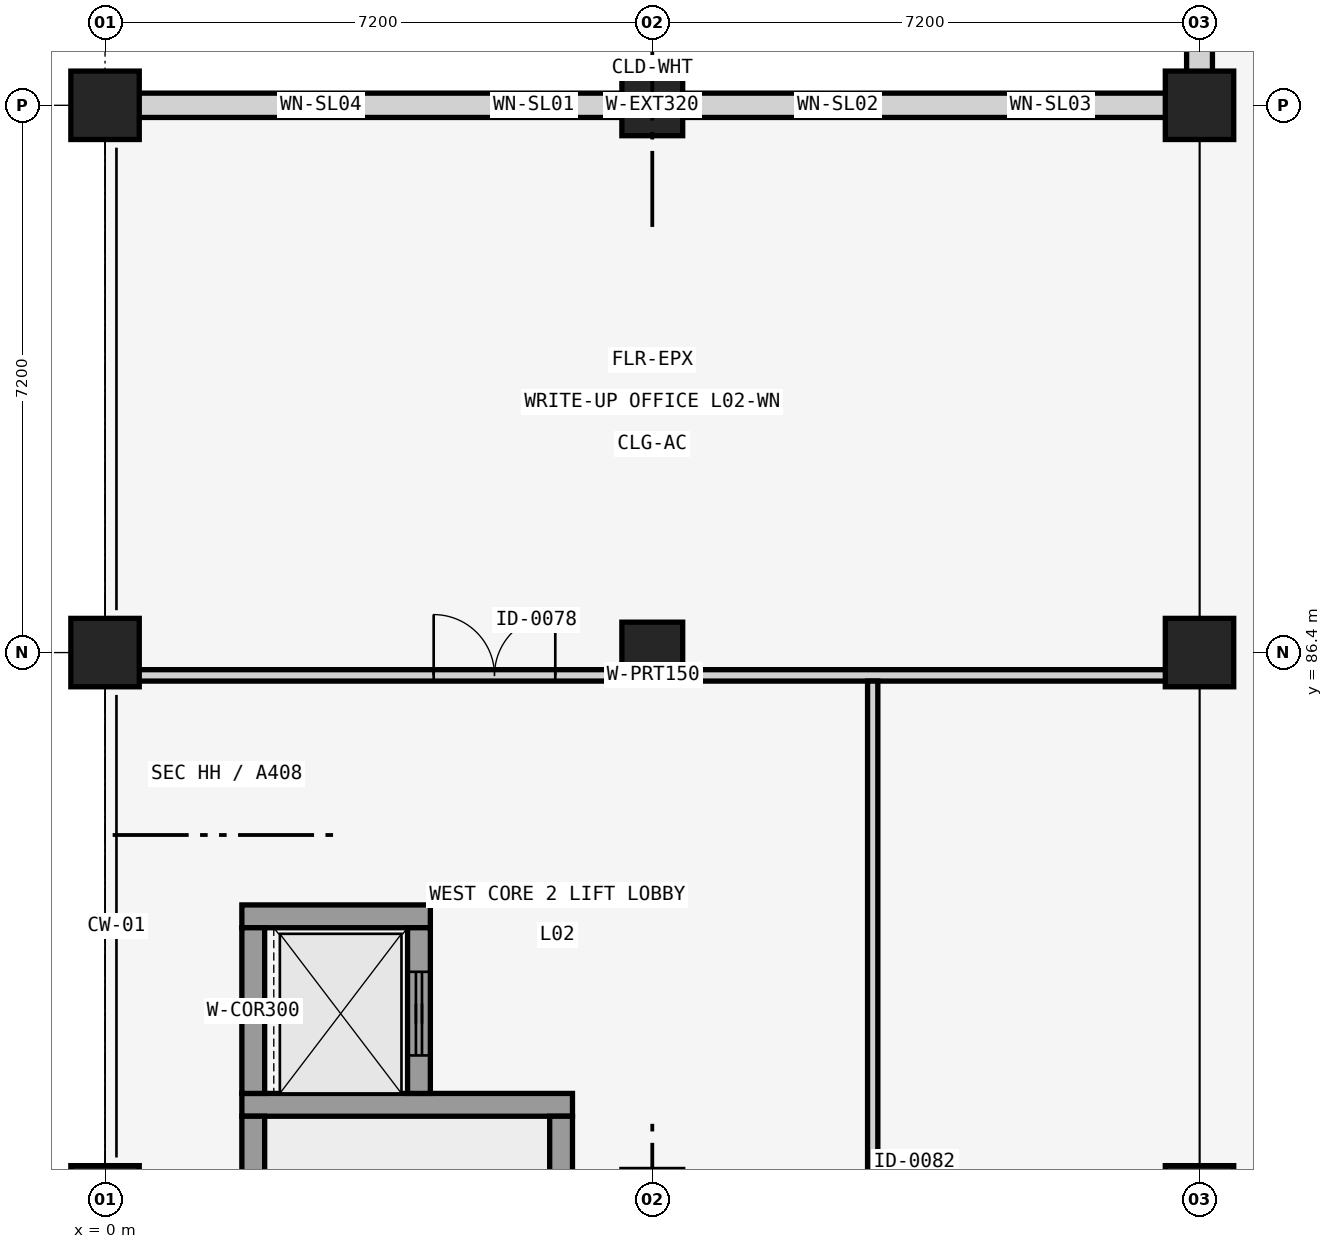
"""IFC4 building model, lengths in metres.
Left out: names, types, materials, properties, quantities, classifications, styles, units other than length and angle.
Written with IfcOpenShell. Run it as: python <this file> out.ifc"""

import sys

from ifc_helpers import new_model, si_unit, direction, frame, frame_2d, origin, origin_2d, place, context, subcontext, project, spatial, rectangle, extrude, element, fill, save


model = new_model("IFC4")
c1 = context("Model", 3, precision=1e-05, world=origin(), true_north=direction((0.0, 1.0)))
c2 = subcontext(c1, "Body", "Model", "MODEL_VIEW")
j1 = project(units=[si_unit("LENGTHUNIT", "METRE"), si_unit("PLANEANGLEUNIT", "RADIAN")], contexts=[c1])
p1 = place(None, origin())
s1 = spatial("IfcSite", under=j1, at=p1, CompositionType="ELEMENT")
p2 = place(p1, origin())
s2 = spatial("IfcBuilding", under=s1, at=p2, CompositionType="ELEMENT")
p3 = place(p2, frame((0.0, 0.0, 8.96)))
s3 = spatial("IfcBuildingStorey", under=s2, at=p3, CompositionType="ELEMENT", Elevation=8.96)
for number, where, z_axis, x_axis in (
    (1, (0.0, 79.2, 0.0), (0.0, 0.0, 1.0), (1.0, 0.0, 0.0)),
    (2, (0.0, 86.4, 0.0), (0.0, 0.0, 1.0), (1.0, 0.0, 0.0)),
    (3, (0.0, 93.6, 0.0), (0.0, 0.0, 1.0), (1.0, 0.0, 0.0)),
):
    element("IfcColumn", number, at=place(p3, frame(where, z_axis=z_axis, x_axis=x_axis)), inside=s3, PredefinedType="COLUMN", context=c2, shape_type="SweptSolid", body=[
        extrude(rectangle(XDim=0.9, YDim=0.9, at=origin_2d()), origin(), (0.0, 0.0, 1.0), 4.16),
    ])
for number, where, z_axis, x_axis in (
    (4, (7.2, 86.4, 0.0), (0.0, 0.0, 1.0), (1.0, 0.0, 0.0)),
    (5, (7.2, 93.6, 0.0), (0.0, 0.0, 1.0), (1.0, 0.0, 0.0)),
):
    element("IfcColumn", number, at=place(p3, frame(where, z_axis=z_axis, x_axis=x_axis)), inside=s3, PredefinedType="COLUMN", context=c2, shape_type="SweptSolid", body=[
        extrude(rectangle(XDim=0.8, YDim=0.8, at=origin_2d()), origin(), (0.0, 0.0, 1.0), 4.16),
    ])
for number, where, z_axis, x_axis in (
    (6, (14.4, 79.2, 0.0), (0.0, 0.0, 1.0), (1.0, 0.0, 0.0)),
    (7, (14.4, 86.4, 0.0), (0.0, 0.0, 1.0), (1.0, 0.0, 0.0)),
    (8, (14.4, 93.6, 0.0), (0.0, 0.0, 1.0), (1.0, 0.0, 0.0)),
):
    element("IfcColumn", number, at=place(p3, frame(where, z_axis=z_axis, x_axis=x_axis)), inside=s3, PredefinedType="COLUMN", context=c2, shape_type="SweptSolid", body=[
        extrude(rectangle(XDim=0.9, YDim=0.9, at=origin_2d()), origin(), (0.0, 0.0, 1.0), 4.16),
    ])
p4 = place(p3, frame((0.44, 93.6, 0.0), z_axis=(0.0, 0.0, 1.0), x_axis=(1.0, 0.0, 0.0)))
e9 = element("IfcWall", 9, at=p4, inside=s3, PredefinedType="SOLIDWALL", context=c2, shape_type="SweptSolid", body=[
    extrude(rectangle(XDim=13.52, YDim=0.32, at=frame_2d((6.76, 0.0))), origin(), (0.0, 0.0, 1.0), 3.42),
])
p5 = place(p4, frame((2.175, 0.0, 0.85)))
e10 = element("IfcOpeningElement", 10, at=p5, cuts=e9, PredefinedType="OPENING", context=c2, shape_type="SweptSolid", body=[
    extrude(rectangle(XDim=0.45, YDim=2.1, at=frame_2d((0.225, 1.05))), frame((0.0, 0.17, 0.0), z_axis=(0.0, -1.0, 0.0), x_axis=(1.0, 0.0, 0.0)), (0.0, 0.0, 1.0), 0.34),
])
p6 = place(p4, frame((4.975, 0.0, 0.85)))
e11 = element("IfcOpeningElement", 11, at=p6, cuts=e9, PredefinedType="OPENING", context=c2, shape_type="SweptSolid", body=[
    extrude(rectangle(XDim=0.45, YDim=2.4, at=frame_2d((0.225, 1.2))), frame((0.0, 0.17, 0.0), z_axis=(0.0, -1.0, 0.0), x_axis=(1.0, 0.0, 0.0)), (0.0, 0.0, 1.0), 0.34),
])
p7 = place(p4, frame((8.95, 0.0, 0.85)))
e12 = element("IfcOpeningElement", 12, at=p7, cuts=e9, PredefinedType="OPENING", context=c2, shape_type="SweptSolid", body=[
    extrude(rectangle(XDim=0.5, YDim=2.4, at=frame_2d((0.25, 1.2))), frame((0.0, 0.17, 0.0), z_axis=(0.0, -1.0, 0.0), x_axis=(1.0, 0.0, 0.0)), (0.0, 0.0, 1.0), 0.34),
])
p8 = place(p4, frame((11.725, 0.0, 0.85)))
e13 = element("IfcOpeningElement", 13, at=p8, cuts=e9, PredefinedType="OPENING", context=c2, shape_type="SweptSolid", body=[
    extrude(rectangle(XDim=0.55, YDim=2.2, at=frame_2d((0.275, 1.1))), frame((0.0, 0.17, 0.0), z_axis=(0.0, -1.0, 0.0), x_axis=(1.0, 0.0, 0.0)), (0.0, 0.0, 1.0), 0.34),
])
p9 = place(p3, frame((14.4, 94.04, 0.0), z_axis=(0.0, 0.0, 1.0), x_axis=(0.0, 1.0, 0.0)))
e14 = element("IfcWall", 14, at=p9, inside=s3, PredefinedType="SOLIDWALL", context=c2, shape_type="SweptSolid", body=[
    extrude(rectangle(XDim=6.42, YDim=0.34, at=frame_2d((3.21, 0.0))), origin(), (0.0, 0.0, 1.0), 3.21),
])
p10 = place(p9, frame((1.198, 0.0, 1.0)))
e15 = element("IfcOpeningElement", 15, at=p10, cuts=e14, PredefinedType="OPENING", context=c2, shape_type="SweptSolid", body=[
    extrude(rectangle(XDim=1.2, YDim=1.65, at=frame_2d((0.6, 0.825))), frame((0.0, 0.18, 0.0), z_axis=(0.0, -1.0, 0.0), x_axis=(1.0, 0.0, 0.0)), (0.0, 0.0, 1.0), 0.36),
])
p11 = place(p9, frame((3.722, 0.0, 1.0)))
e16 = element("IfcOpeningElement", 16, at=p11, cuts=e14, PredefinedType="OPENING", context=c2, shape_type="SweptSolid", body=[
    extrude(rectangle(XDim=1.8, YDim=1.65, at=frame_2d((0.9, 0.825))), frame((0.0, 0.18, 0.0), z_axis=(0.0, -1.0, 0.0), x_axis=(1.0, 0.0, 0.0)), (0.0, 0.0, 1.0), 0.36),
])
p12 = place(p3, frame((1.8, 80.45, 0.0), z_axis=(0.0, 0.0, 1.0), x_axis=(1.0, 0.0, 0.0)))
e17 = element("IfcWall", 17, at=p12, inside=s3, PredefinedType="SHEAR", context=c2, shape_type="SweptSolid", body=[
    extrude(rectangle(XDim=4.35, YDim=0.3, at=frame_2d((2.175, 0.0))), origin(), (0.0, 0.0, 1.0), 3.81),
])
p13 = place(p3, frame((1.95, 72.5, 0.0), z_axis=(0.0, 0.0, 1.0), x_axis=(0.0, 1.0, 0.0)))
e18 = element("IfcWall", 18, at=p13, inside=s3, PredefinedType="SHEAR", context=c2, shape_type="SweptSolid", body=[
    extrude(rectangle(XDim=7.8, YDim=0.3, at=frame_2d((3.9, 0.0))), origin(), (0.0, 0.0, 1.0), 3.81),
])
p14 = place(p3, frame((6.0, 72.5, 0.0), z_axis=(0.0, 0.0, 1.0), x_axis=(0.0, 1.0, 0.0)))
e19 = element("IfcWall", 19, at=p14, inside=s3, PredefinedType="SHEAR", context=c2, shape_type="SweptSolid", body=[
    extrude(rectangle(XDim=7.8, YDim=0.3, at=frame_2d((3.9, 0.0))), origin(), (0.0, 0.0, 1.0), 3.81),
])
p15 = place(p14, frame((0.4, 0.0, 0.0)))
e20 = element("IfcOpeningElement", 20, at=p15, cuts=e19, PredefinedType="OPENING", context=c2, shape_type="SweptSolid", body=[
    extrude(rectangle(XDim=1.15, YDim=2.2, at=frame_2d((0.575, 1.1))), frame((0.0, 0.16, 0.0), z_axis=(0.0, -1.0, 0.0), x_axis=(1.0, 0.0, 0.0)), (0.0, 0.0, 1.0), 0.32),
])
p16 = place(p3, frame((1.8, 82.93, 0.0), z_axis=(0.0, 0.0, 1.0), x_axis=(1.0, 0.0, 0.0)))
e21 = element("IfcWall", 21, at=p16, inside=s3, PredefinedType="SHEAR", context=c2, shape_type="SweptSolid", body=[
    extrude(rectangle(XDim=2.48, YDim=0.3, at=frame_2d((1.24, 0.0))), origin(), (0.0, 0.0, 1.0), 3.81),
])
p17 = place(p3, frame((1.95, 80.6, 0.0), z_axis=(0.0, 0.0, 1.0), x_axis=(0.0, 1.0, 0.0)))
e22 = element("IfcWall", 22, at=p17, inside=s3, PredefinedType="SHEAR", context=c2, shape_type="SweptSolid", body=[
    extrude(rectangle(XDim=2.18, YDim=0.3, at=frame_2d((1.09, 0.0))), origin(), (0.0, 0.0, 1.0), 3.81),
])
p18 = place(p3, frame((4.13, 80.6, 0.0), z_axis=(0.0, 0.0, 1.0), x_axis=(0.0, 1.0, 0.0)))
e23 = element("IfcWall", 23, at=p18, inside=s3, PredefinedType="SHEAR", context=c2, shape_type="SweptSolid", body=[
    extrude(rectangle(XDim=2.18, YDim=0.3, at=frame_2d((1.09, 0.0))), origin(), (0.0, 0.0, 1.0), 3.81),
])
p19 = place(p18, frame((0.5, 0.0, 0.0)))
e24 = element("IfcOpeningElement", 24, at=p19, cuts=e23, PredefinedType="OPENING", context=c2, shape_type="SweptSolid", body=[
    extrude(rectangle(XDim=1.1, YDim=2.2, at=frame_2d((0.55, 1.1))), frame((0.0, 0.16, 0.0), z_axis=(0.0, -1.0, 0.0), x_axis=(1.0, 0.0, 0.0)), (0.0, 0.0, 1.0), 0.32),
])
p20 = place(p3, frame((0.25, 86.1, 0.0), z_axis=(0.0, 0.0, 1.0), x_axis=(1.0, 0.0, 0.0)))
e25 = element("IfcWall", 25, at=p20, inside=s3, PredefinedType="PARTITIONING", context=c2, shape_type="SweptSolid", body=[
    extrude(rectangle(XDim=13.925, YDim=0.15, at=frame_2d((6.962, 0.0))), origin(), (0.0, 0.0, 1.0), 3.21),
])
p21 = place(p20, frame((4.074, 0.0, 0.0)))
e26 = element("IfcOpeningElement", 26, at=p21, cuts=e25, PredefinedType="OPENING", context=c2, shape_type="SweptSolid", body=[
    extrude(rectangle(XDim=1.6, YDim=2.25, at=frame_2d((0.8, 1.125))), frame((0.0, 0.085, 0.0), z_axis=(0.0, -1.0, 0.0), x_axis=(1.0, 0.0, 0.0)), (0.0, 0.0, 1.0), 0.17),
])
p22 = place(p3, frame((10.1, 71.9, 0.0), z_axis=(0.0, 0.0, 1.0), x_axis=(0.0, 1.0, 0.0)))
e27 = element("IfcWall", 27, at=p22, inside=s3, PredefinedType="PARTITIONING", context=c2, shape_type="SweptSolid", body=[
    extrude(rectangle(XDim=14.125, YDim=0.135, at=frame_2d((7.062, 0.0))), origin(), (0.0, 0.0, 1.0), 3.21),
])
p23 = place(p22, frame((6.562, 0.0, 0.0)))
e28 = element("IfcOpeningElement", 28, at=p23, cuts=e27, PredefinedType="OPENING", context=c2, shape_type="SweptSolid", body=[
    extrude(rectangle(XDim=1.0, YDim=2.1, at=frame_2d((0.5, 1.05))), frame((0.0, 0.078, 0.0), z_axis=(0.0, -1.0, 0.0), x_axis=(1.0, 0.0, 0.0)), (0.0, 0.0, 1.0), 0.155),
])
p24 = place(p5, origin())
e29 = element("IfcWindow", 29, at=p24, inside=s3, PartitioningType="SINGLE_PANEL", PredefinedType="WINDOW", context=c2, shape_type="SweptSolid", body=[
    extrude(rectangle(XDim=0.45, YDim=2.1, at=frame_2d((0.225, 1.05))), frame((0.0, 0.03, 0.0), z_axis=(0.0, -1.0, 0.0), x_axis=(1.0, 0.0, 0.0)), (0.0, 0.0, 1.0), 0.06),
])
fill(e10, e29)
p25 = place(p6, origin())
e30 = element("IfcWindow", 30, at=p25, inside=s3, PartitioningType="SINGLE_PANEL", PredefinedType="WINDOW", context=c2, shape_type="SweptSolid", body=[
    extrude(rectangle(XDim=0.45, YDim=2.4, at=frame_2d((0.225, 1.2))), frame((0.0, 0.03, 0.0), z_axis=(0.0, -1.0, 0.0), x_axis=(1.0, 0.0, 0.0)), (0.0, 0.0, 1.0), 0.06),
])
fill(e11, e30)
p26 = place(p7, origin())
e31 = element("IfcWindow", 31, at=p26, inside=s3, PartitioningType="SINGLE_PANEL", PredefinedType="WINDOW", context=c2, shape_type="SweptSolid", body=[
    extrude(rectangle(XDim=0.5, YDim=2.4, at=frame_2d((0.25, 1.2))), frame((0.0, 0.03, 0.0), z_axis=(0.0, -1.0, 0.0), x_axis=(1.0, 0.0, 0.0)), (0.0, 0.0, 1.0), 0.06),
])
fill(e12, e31)
p27 = place(p8, origin())
e32 = element("IfcWindow", 32, at=p27, inside=s3, PartitioningType="SINGLE_PANEL", PredefinedType="WINDOW", context=c2, shape_type="SweptSolid", body=[
    extrude(rectangle(XDim=0.55, YDim=2.2, at=frame_2d((0.275, 1.1))), frame((0.0, 0.03, 0.0), z_axis=(0.0, -1.0, 0.0), x_axis=(1.0, 0.0, 0.0)), (0.0, 0.0, 1.0), 0.06),
])
fill(e13, e32)
p28 = place(p19, origin())
e33 = element("IfcDoor", 33, at=p28, inside=s3, OperationType="SLIDING_TO_LEFT", PredefinedType="DOOR", context=c2, shape_type="SweptSolid", body=[
    extrude(rectangle(XDim=1.1, YDim=2.2, at=frame_2d((0.55, 1.1))), frame((0.0, 0.025, 0.0), z_axis=(0.0, -1.0, 0.0), x_axis=(1.0, 0.0, 0.0)), (0.0, 0.0, 1.0), 0.05),
])
fill(e24, e33)
p29 = place(p21, origin())
e34 = element("IfcDoor", 34, at=p29, inside=s3, OperationType="DOUBLE_DOOR_SINGLE_SWING", PredefinedType="DOOR", context=c2, shape_type="SweptSolid", body=[
    extrude(rectangle(XDim=1.6, YDim=2.25, at=frame_2d((0.8, 1.125))), frame((0.0, 0.025, 0.0), z_axis=(0.0, -1.0, 0.0), x_axis=(1.0, 0.0, 0.0)), (0.0, 0.0, 1.0), 0.05),
])
fill(e26, e34)
save(model, sys.argv[1])
